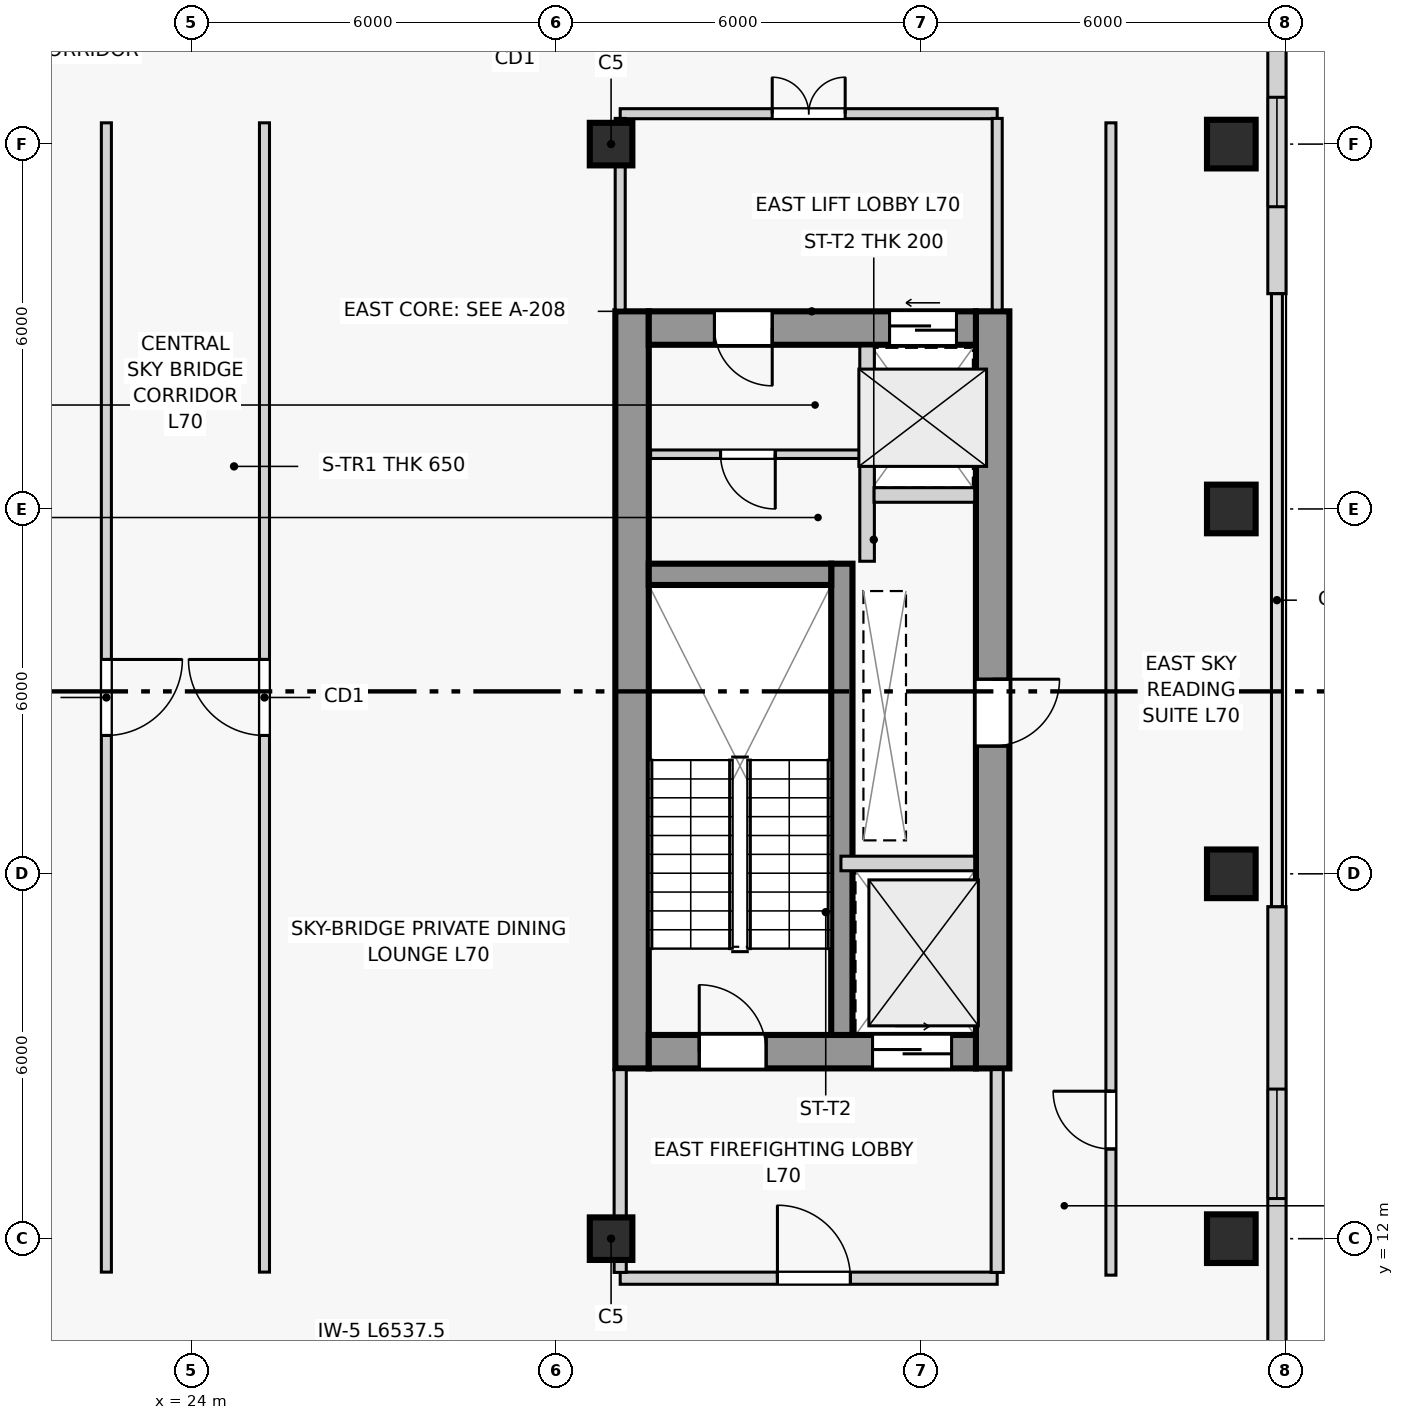
"""IFC4 building model, lengths in metres.
Left out: names, types, materials, properties, quantities, classifications, styles, units other than length and angle.
Written with IfcOpenShell. Run it as: python <this file> out.ifc"""

import sys

from ifc_helpers import new_model, si_unit, direction, frame, frame_2d, origin, origin_2d, place, context, subcontext, project, spatial, rectangle, extrude, source, transform, mapped, element, fill, save


model = new_model("IFC4")
c1 = context("Model", 3, precision=1e-05, world=origin(), true_north=direction((0.0, 1.0)))
c2 = subcontext(c1, "Body", "Model", "MODEL_VIEW")
j1 = project(units=[si_unit("LENGTHUNIT", "METRE"), si_unit("PLANEANGLEUNIT", "RADIAN")], contexts=[c1])
p1 = place(None, origin())
s1 = spatial("IfcSite", under=j1, at=p1, CompositionType="ELEMENT")
p2 = place(p1, origin())
s2 = spatial("IfcBuilding", under=s1, at=p2, CompositionType="ELEMENT")
p3 = place(p2, frame((0.0, 0.0, 267.3)))
s3 = spatial("IfcBuildingStorey", under=s2, at=p3, CompositionType="ELEMENT", Elevation=267.3)
p4 = place(p3, frame((31.245, 14.8, 0.0), z_axis=(0.0, 0.0, 1.0), x_axis=(0.0, 1.0, 0.0)))
e1 = element("IfcWall", 1, at=p4, inside=s3, PredefinedType="SHEAR", context=c2, shape_type="SweptSolid", body=[
    extrude(rectangle(XDim=12.45, YDim=0.55, at=frame_2d((6.225, 0.0))), origin(), (0.0, 0.0, 1.0), 3.6),
])
p5 = place(p3, frame((37.175, 14.8, 0.0), z_axis=(0.0, 0.0, 1.0), x_axis=(0.0, 1.0, 0.0)))
e2 = element("IfcWall", 2, at=p5, inside=s3, PredefinedType="SHEAR", context=c2, shape_type="SweptSolid", body=[
    extrude(rectangle(XDim=12.45, YDim=0.55, at=frame_2d((6.225, 0.0))), origin(), (0.0, 0.0, 1.0), 3.6),
])
p6 = place(p5, frame((5.3, 0.0, 0.0)))
e3 = element("IfcOpeningElement", 3, at=p6, cuts=e2, PredefinedType="OPENING", context=c2, shape_type="SweptSolid", body=[
    extrude(rectangle(XDim=1.1, YDim=2.2, at=frame_2d((0.55, 1.1))), frame((0.0, 0.285, 0.0), z_axis=(0.0, -1.0, 0.0), x_axis=(1.0, 0.0, 0.0)), (0.0, 0.0, 1.0), 0.57),
])
p7 = place(p3, frame((31.52, 15.075, 0.0), z_axis=(0.0, 0.0, 1.0), x_axis=(1.0, 0.0, 0.0)))
e4 = element("IfcWall", 4, at=p7, inside=s3, PredefinedType="SHEAR", context=c2, shape_type="SweptSolid", body=[
    extrude(rectangle(XDim=5.38, YDim=0.55, at=frame_2d((2.69, 0.0))), origin(), (0.0, 0.0, 1.0), 3.6),
])
p8 = place(p7, frame((0.83, 0.0, 0.0)))
e5 = element("IfcOpeningElement", 5, at=p8, cuts=e4, PredefinedType="OPENING", context=c2, shape_type="SweptSolid", body=[
    extrude(rectangle(XDim=1.1, YDim=2.2, at=frame_2d((0.55, 1.1))), frame((0.0, 0.285, 0.0), z_axis=(0.0, -1.0, 0.0), x_axis=(1.0, 0.0, 0.0)), (0.0, 0.0, 1.0), 0.57),
])
p9 = place(p7, frame((3.68, 0.0, 0.0)))
e6 = element("IfcOpeningElement", 6, at=p9, cuts=e4, PredefinedType="OPENING", context=c2, shape_type="SweptSolid", body=[
    extrude(rectangle(XDim=1.3, YDim=2.2, at=frame_2d((0.65, 1.1))), frame((0.0, 0.285, 0.0), z_axis=(0.0, -1.0, 0.0), x_axis=(1.0, 0.0, 0.0)), (0.0, 0.0, 1.0), 0.57),
])
p10 = place(p3, frame((31.52, 26.975, 0.0), z_axis=(0.0, 0.0, 1.0), x_axis=(1.0, 0.0, 0.0)))
e7 = element("IfcWall", 7, at=p10, inside=s3, PredefinedType="SHEAR", context=c2, shape_type="SweptSolid", body=[
    extrude(rectangle(XDim=5.38, YDim=0.55, at=frame_2d((2.69, 0.0))), origin(), (0.0, 0.0, 1.0), 3.6),
])
p11 = place(p10, frame((1.08, 0.0, 0.0)))
e8 = element("IfcOpeningElement", 8, at=p11, cuts=e7, PredefinedType="OPENING", context=c2, shape_type="SweptSolid", body=[
    extrude(rectangle(XDim=0.95, YDim=2.1, at=frame_2d((0.475, 1.05))), frame((0.0, 0.285, 0.0), z_axis=(0.0, -1.0, 0.0), x_axis=(1.0, 0.0, 0.0)), (0.0, 0.0, 1.0), 0.57),
])
p12 = place(p10, frame((3.96, 0.0, 0.0)))
e9 = element("IfcOpeningElement", 9, at=p12, cuts=e7, PredefinedType="OPENING", context=c2, shape_type="SweptSolid", body=[
    extrude(rectangle(XDim=1.1, YDim=2.2, at=frame_2d((0.55, 1.1))), frame((0.0, 0.285, 0.0), z_axis=(0.0, -1.0, 0.0), x_axis=(1.0, 0.0, 0.0)), (0.0, 0.0, 1.0), 0.57),
])
p13 = place(p3, frame((34.695, 15.35, 0.0), z_axis=(0.0, 0.0, 1.0), x_axis=(0.0, 1.0, 0.0)))
e10 = element("IfcWall", 10, at=p13, inside=s3, PredefinedType="SHEAR", context=c2, shape_type="SweptSolid", body=[
    extrude(rectangle(XDim=7.75, YDim=0.35, at=frame_2d((3.875, 0.0))), origin(), (0.0, 0.0, 1.0), 3.6),
])
p14 = place(p3, frame((31.52, 22.925, 0.0), z_axis=(0.0, 0.0, 1.0), x_axis=(1.0, 0.0, 0.0)))
e11 = element("IfcWall", 11, at=p14, inside=s3, PredefinedType="SHEAR", context=c2, shape_type="SweptSolid", body=[
    extrude(rectangle(XDim=3.0, YDim=0.35, at=frame_2d((1.5, 0.0))), origin(), (0.0, 0.0, 1.0), 3.6),
])
m1 = source(origin(), c2, "Body", "SweptSolid", [
    extrude(rectangle(XDim=0.8, YDim=0.8, at=origin_2d()), origin(), (0.0, 0.0, 1.0), 3.6),
])
for number, where, z_axis, x_axis in (
    (12, (41.1, 12.0, 0.0), (0.0, 0.0, 1.0), (1.0, 0.0, 0.0)),
    (13, (41.1, 18.0, 0.0), (0.0, 0.0, 1.0), (1.0, 0.0, 0.0)),
    (14, (41.1, 24.0, 0.0), (0.0, 0.0, 1.0), (1.0, 0.0, 0.0)),
    (15, (41.1, 30.0, 0.0), (0.0, 0.0, 1.0), (1.0, 0.0, 0.0)),
):
    element("IfcColumn", number, at=place(p3, frame(where, z_axis=z_axis, x_axis=x_axis)), inside=s3, PredefinedType="COLUMN", context=c2, shape_type="MappedRepresentation", body=[
        mapped(m1, transform((0.0, 0.0, 0.0), scale=1.0)),
    ])
m2 = source(origin(), c2, "Body", "SweptSolid", [
    extrude(rectangle(XDim=0.7, YDim=0.7, at=origin_2d()), origin(), (0.0, 0.0, 1.0), 3.6),
])
for number, where, z_axis, x_axis in (
    (16, (30.9, 12.0, 0.0), (0.0, 0.0, 1.0), (1.0, 0.0, 0.0)),
    (17, (30.9, 30.0, 0.0), (0.0, 0.0, 1.0), (1.0, 0.0, 0.0)),
):
    element("IfcColumn", number, at=place(p3, frame(where, z_axis=z_axis, x_axis=x_axis)), inside=s3, PredefinedType="COLUMN", context=c2, shape_type="MappedRepresentation", body=[
        mapped(m2, transform((0.0, 0.0, 0.0), scale=1.0)),
    ])
p15 = place(p3, frame((41.85, 6.75, 0.0), z_axis=(0.0, 0.0, 1.0), x_axis=(0.0, 1.0, 0.0)))
e18 = element("IfcWall", 18, at=p15, inside=s3, PredefinedType="SOLIDWALL", context=c2, shape_type="SweptSolid", body=[
    extrude(rectangle(XDim=10.71, YDim=0.3, at=frame_2d((5.355, 0.0))), origin(), (0.0, 0.0, 1.0), 3.32),
])
p16 = place(p15, frame((0.655, 0.0, 0.8)))
e19 = element("IfcOpeningElement", 19, at=p16, cuts=e18, PredefinedType="OPENING", context=c2, shape_type="SweptSolid", body=[
    extrude(rectangle(XDim=1.8, YDim=2.1, at=frame_2d((0.9, 1.05))), frame((0.0, 0.16, 0.0), z_axis=(0.0, -1.0, 0.0), x_axis=(1.0, 0.0, 0.0)), (0.0, 0.0, 1.0), 0.32),
])
p17 = place(p15, frame((5.91, 0.0, 0.8)))
e20 = element("IfcOpeningElement", 20, at=p17, cuts=e18, PredefinedType="OPENING", context=c2, shape_type="SweptSolid", body=[
    extrude(rectangle(XDim=1.8, YDim=2.1, at=frame_2d((0.9, 1.05))), frame((0.0, 0.16, 0.0), z_axis=(0.0, -1.0, 0.0), x_axis=(1.0, 0.0, 0.0)), (0.0, 0.0, 1.0), 0.32),
])
p18 = place(p3, frame((41.85, 27.54, 0.0), z_axis=(0.0, 0.0, 1.0), x_axis=(0.0, 1.0, 0.0)))
e21 = element("IfcWall", 21, at=p18, inside=s3, PredefinedType="SOLIDWALL", context=c2, shape_type="SweptSolid", body=[
    extrude(rectangle(XDim=10.71, YDim=0.3, at=frame_2d((5.355, 0.0))), origin(), (0.0, 0.0, 1.0), 3.32),
])
p19 = place(p18, frame((1.43, 0.0, 0.8)))
e22 = element("IfcOpeningElement", 22, at=p19, cuts=e21, PredefinedType="OPENING", context=c2, shape_type="SweptSolid", body=[
    extrude(rectangle(XDim=1.8, YDim=2.1, at=frame_2d((0.9, 1.05))), frame((0.0, 0.16, 0.0), z_axis=(0.0, -1.0, 0.0), x_axis=(1.0, 0.0, 0.0)), (0.0, 0.0, 1.0), 0.32),
])
p20 = place(p18, frame((6.685, 0.0, 0.8)))
e23 = element("IfcOpeningElement", 23, at=p20, cuts=e21, PredefinedType="OPENING", context=c2, shape_type="SweptSolid", body=[
    extrude(rectangle(XDim=1.8, YDim=2.1, at=frame_2d((0.9, 1.05))), frame((0.0, 0.16, 0.0), z_axis=(0.0, -1.0, 0.0), x_axis=(1.0, 0.0, 0.0)), (0.0, 0.0, 1.0), 0.32),
])
p21 = place(p3, frame((34.68, 18.17, 0.0), z_axis=(0.0, 0.0, 1.0), x_axis=(1.0, 0.0, 0.0)))
e24 = element("IfcWall", 24, at=p21, inside=s3, PredefinedType="PARTITIONING", context=c2, shape_type="SweptSolid", body=[
    extrude(rectangle(XDim=2.2, YDim=0.24, at=frame_2d((1.1, 0.0))), origin(), (0.0, 0.0, 1.0), 3.32),
])
p22 = place(p3, frame((31.05, 11.35, 0.0), z_axis=(0.0, 0.0, 1.0), x_axis=(1.0, 0.0, 0.0)))
e25 = element("IfcWall", 25, at=p22, inside=s3, PredefinedType="PARTITIONING", context=c2, shape_type="SweptSolid", body=[
    extrude(rectangle(XDim=6.2, YDim=0.2, at=frame_2d((3.1, 0.0))), origin(), (0.0, 0.0, 1.0), 3.32),
])
p23 = place(p22, frame((2.586, 0.0, 0.0)))
e26 = element("IfcOpeningElement", 26, at=p23, cuts=e25, PredefinedType="OPENING", context=c2, shape_type="SweptSolid", body=[
    extrude(rectangle(XDim=1.2, YDim=2.2, at=frame_2d((0.6, 1.1))), frame((0.0, 0.11, 0.0), z_axis=(0.0, -1.0, 0.0), x_axis=(1.0, 0.0, 0.0)), (0.0, 0.0, 1.0), 0.22),
])
p24 = place(p3, frame((31.05, 11.445, 0.0), z_axis=(0.0, 0.0, 1.0), x_axis=(0.0, 1.0, 0.0)))
e27 = element("IfcWall", 27, at=p24, inside=s3, PredefinedType="PARTITIONING", context=c2, shape_type="SweptSolid", body=[
    extrude(rectangle(XDim=3.335, YDim=0.2, at=frame_2d((1.667, 0.0))), origin(), (0.0, 0.0, 1.0), 2.47),
])
p25 = place(p3, frame((37.25, 11.445, 0.0), z_axis=(0.0, 0.0, 1.0), x_axis=(0.0, 1.0, 0.0)))
e28 = element("IfcWall", 28, at=p25, inside=s3, PredefinedType="PARTITIONING", context=c2, shape_type="SweptSolid", body=[
    extrude(rectangle(XDim=3.335, YDim=0.2, at=frame_2d((1.667, 0.0))), origin(), (0.0, 0.0, 1.0), 3.32),
])
p26 = place(p3, frame((35.11, 23.14, 0.0), z_axis=(0.0, 0.0, 1.0), x_axis=(0.0, 1.0, 0.0)))
e29 = element("IfcWall", 29, at=p26, inside=s3, PredefinedType="PARTITIONING", context=c2, shape_type="SweptSolid", body=[
    extrude(rectangle(XDim=3.54, YDim=0.24, at=frame_2d((1.77, 0.0))), origin(), (0.0, 0.0, 1.0), 3.32),
])
p27 = place(p3, frame((35.225, 24.23, 0.0), z_axis=(0.0, 0.0, 1.0), x_axis=(1.0, 0.0, 0.0)))
e30 = element("IfcWall", 30, at=p27, inside=s3, PredefinedType="PARTITIONING", context=c2, shape_type="SweptSolid", body=[
    extrude(rectangle(XDim=1.655, YDim=0.24, at=frame_2d((0.827, 0.0))), origin(), (0.0, 0.0, 1.0), 3.32),
])
p28 = place(p3, frame((31.55, 24.9, 0.0), z_axis=(0.0, 0.0, 1.0), x_axis=(1.0, 0.0, 0.0)))
e31 = element("IfcWall", 31, at=p28, inside=s3, PredefinedType="PARTITIONING", context=c2, shape_type="SweptSolid", body=[
    extrude(rectangle(XDim=3.445, YDim=0.14, at=frame_2d((1.723, 0.0))), origin(), (0.0, 0.0, 1.0), 3.32),
])
p29 = place(p28, frame((1.15, 0.0, 0.0)))
e32 = element("IfcOpeningElement", 32, at=p29, cuts=e31, PredefinedType="OPENING", context=c2, shape_type="SweptSolid", body=[
    extrude(rectangle(XDim=0.9, YDim=2.1, at=frame_2d((0.45, 1.05))), frame((0.0, 0.08, 0.0), z_axis=(0.0, -1.0, 0.0), x_axis=(1.0, 0.0, 0.0)), (0.0, 0.0, 1.0), 0.16),
])
p30 = place(p3, frame((31.05, 30.5, 0.0), z_axis=(0.0, 0.0, 1.0), x_axis=(1.0, 0.0, 0.0)))
e33 = element("IfcWall", 33, at=p30, inside=s3, PredefinedType="PARTITIONING", context=c2, shape_type="SweptSolid", body=[
    extrude(rectangle(XDim=6.2, YDim=0.165, at=frame_2d((3.1, 0.0))), origin(), (0.0, 0.0, 1.0), 3.32),
])
p31 = place(p30, frame((2.5, 0.0, 0.0)))
e34 = element("IfcOpeningElement", 34, at=p31, cuts=e33, PredefinedType="OPENING", context=c2, shape_type="SweptSolid", body=[
    extrude(rectangle(XDim=1.2, YDim=2.2, at=frame_2d((0.6, 1.1))), frame((0.0, 0.093, 0.0), z_axis=(0.0, -1.0, 0.0), x_axis=(1.0, 0.0, 0.0)), (0.0, 0.0, 1.0), 0.185),
])
for number, where, z_axis, x_axis in (
    (35, (31.05, 27.27, 0.0), (0.0, 0.0, 1.0), (0.0, 1.0, 0.0)),
    (36, (37.25, 27.27, 0.0), (0.0, 0.0, 1.0), (0.0, 1.0, 0.0)),
):
    element("IfcWall", number, at=place(p3, frame(where, z_axis=z_axis, x_axis=x_axis)), inside=s3, PredefinedType="PARTITIONING", context=c2, shape_type="SweptSolid", body=[
        extrude(rectangle(XDim=3.153, YDim=0.165, at=frame_2d((1.576, 0.0))), origin(), (0.0, 0.0, 1.0), 3.32),
    ])
p32 = place(p3, frame((22.6, 11.45, 0.0), z_axis=(0.0, 0.0, 1.0), x_axis=(0.0, 1.0, 0.0)))
e37 = element("IfcWall", 37, at=p32, inside=s3, PredefinedType="PARTITIONING", context=c2, shape_type="SweptSolid", body=[
    extrude(rectangle(XDim=18.9, YDim=0.165, at=frame_2d((9.45, 0.0))), origin(), (0.0, 0.0, 1.0), 3.32),
])
p33 = place(p32, frame((8.825, 0.0, 0.0)))
e38 = element("IfcOpeningElement", 38, at=p33, cuts=e37, PredefinedType="OPENING", context=c2, shape_type="SweptSolid", body=[
    extrude(rectangle(XDim=1.25, YDim=2.2, at=frame_2d((0.625, 1.1))), frame((0.0, 0.093, 0.0), z_axis=(0.0, -1.0, 0.0), x_axis=(1.0, 0.0, 0.0)), (0.0, 0.0, 1.0), 0.185),
])
p34 = place(p3, frame((25.2, 11.45, 0.0), z_axis=(0.0, 0.0, 1.0), x_axis=(0.0, 1.0, 0.0)))
e39 = element("IfcWall", 39, at=p34, inside=s3, PredefinedType="PARTITIONING", context=c2, shape_type="SweptSolid", body=[
    extrude(rectangle(XDim=18.9, YDim=0.165, at=frame_2d((9.45, 0.0))), origin(), (0.0, 0.0, 1.0), 3.32),
])
p35 = place(p34, frame((8.825, 0.0, 0.0)))
e40 = element("IfcOpeningElement", 40, at=p35, cuts=e39, PredefinedType="OPENING", context=c2, shape_type="SweptSolid", body=[
    extrude(rectangle(XDim=1.25, YDim=2.2, at=frame_2d((0.625, 1.1))), frame((0.0, 0.093, 0.0), z_axis=(0.0, -1.0, 0.0), x_axis=(1.0, 0.0, 0.0)), (0.0, 0.0, 1.0), 0.185),
])
p36 = place(p3, frame((39.12, 11.4, 0.0), z_axis=(0.0, 0.0, 1.0), x_axis=(0.0, 1.0, 0.0)))
e41 = element("IfcWall", 41, at=p36, inside=s3, PredefinedType="PARTITIONING", context=c2, shape_type="SweptSolid", body=[
    extrude(rectangle(XDim=18.95, YDim=0.165, at=frame_2d((9.475, 0.0))), origin(), (0.0, 0.0, 1.0), 3.32),
])
p37 = place(p36, frame((2.075, 0.0, 0.0)))
e42 = element("IfcOpeningElement", 42, at=p37, cuts=e41, PredefinedType="OPENING", context=c2, shape_type="SweptSolid", body=[
    extrude(rectangle(XDim=0.95, YDim=2.1, at=frame_2d((0.475, 1.05))), frame((0.0, 0.093, 0.0), z_axis=(0.0, -1.0, 0.0), x_axis=(1.0, 0.0, 0.0)), (0.0, 0.0, 1.0), 0.185),
])
m3 = source(origin(), c2, "Body", "SweptSolid", [
    extrude(rectangle(XDim=1.8, YDim=2.1, at=frame_2d((0.9, 1.05))), frame((0.0, 0.03, 0.0), z_axis=(0.0, -1.0, 0.0), x_axis=(1.0, 0.0, 0.0)), (0.0, 0.0, 1.0), 0.06),
])
p38 = place(p17, origin())
e43 = element("IfcWindow", 43, at=p38, inside=s3, PartitioningType="SINGLE_PANEL", PredefinedType="WINDOW", context=c2, shape_type="MappedRepresentation", body=[
    mapped(m3, transform((0.0, 0.0, 0.0), scale=1.0)),
])
fill(e20, e43)
p39 = place(p19, origin())
e44 = element("IfcWindow", 44, at=p39, inside=s3, PartitioningType="SINGLE_PANEL", PredefinedType="WINDOW", context=c2, shape_type="MappedRepresentation", body=[
    mapped(m3, transform((0.0, 0.0, 0.0), scale=1.0)),
])
fill(e22, e44)
m4 = source(origin(), c2, "Body", "SweptSolid", [
    extrude(rectangle(XDim=1.1, YDim=2.2, at=frame_2d((0.55, 1.1))), frame((0.0, 0.025, 0.0), z_axis=(0.0, -1.0, 0.0), x_axis=(1.0, 0.0, 0.0)), (0.0, 0.0, 1.0), 0.05),
])
p40 = place(p8, origin())
e45 = element("IfcDoor", 45, at=p40, inside=s3, OperationType="SINGLE_SWING_LEFT", PredefinedType="DOOR", context=c2, shape_type="MappedRepresentation", body=[
    mapped(m4, transform((0.0, 0.0, 0.0), scale=1.0)),
])
fill(e5, e45)
m5 = source(origin(), c2, "Body", "SweptSolid", [
    extrude(rectangle(XDim=1.3, YDim=2.2, at=frame_2d((0.65, 1.1))), frame((0.0, 0.025, 0.0), z_axis=(0.0, -1.0, 0.0), x_axis=(1.0, 0.0, 0.0)), (0.0, 0.0, 1.0), 0.05),
])
p41 = place(p9, origin())
e46 = element("IfcDoor", 46, at=p41, inside=s3, OperationType="SLIDING_TO_RIGHT", PredefinedType="DOOR", context=c2, shape_type="MappedRepresentation", body=[
    mapped(m5, transform((0.0, 0.0, 0.0), scale=1.0)),
])
fill(e6, e46)
m6 = source(origin(), c2, "Body", "SweptSolid", [
    extrude(rectangle(XDim=1.2, YDim=2.2, at=frame_2d((0.6, 1.1))), frame((0.0, 0.025, 0.0), z_axis=(0.0, -1.0, 0.0), x_axis=(1.0, 0.0, 0.0)), (0.0, 0.0, 1.0), 0.05),
])
p42 = place(p23, origin())
e47 = element("IfcDoor", 47, at=p42, inside=s3, OperationType="SINGLE_SWING_LEFT", PredefinedType="DOOR", context=c2, shape_type="MappedRepresentation", body=[
    mapped(m6, transform((0.0, 0.0, 0.0), scale=1.0)),
])
fill(e26, e47)
m7 = source(origin(), c2, "Body", "SweptSolid", [
    extrude(rectangle(XDim=0.95, YDim=2.1, at=frame_2d((0.475, 1.05))), frame((0.0, 0.025, 0.0), z_axis=(0.0, -1.0, 0.0), x_axis=(1.0, 0.0, 0.0)), (0.0, 0.0, 1.0), 0.05),
])
p43 = place(p11, frame((0.95, 0.0, 0.0), z_axis=(0.0, 0.0, 1.0), x_axis=(-1.0, 0.0, 0.0)))
e48 = element("IfcDoor", 48, at=p43, inside=s3, OperationType="SINGLE_SWING_LEFT", PredefinedType="DOOR", context=c2, shape_type="MappedRepresentation", body=[
    mapped(m7, transform((0.0, 0.0, 0.0), scale=1.0)),
])
fill(e8, e48)
m8 = source(origin(), c2, "Body", "SweptSolid", [
    extrude(rectangle(XDim=0.9, YDim=2.1, at=frame_2d((0.45, 1.05))), frame((0.0, 0.025, 0.0), z_axis=(0.0, -1.0, 0.0), x_axis=(1.0, 0.0, 0.0)), (0.0, 0.0, 1.0), 0.05),
])
p44 = place(p29, frame((0.9, 0.0, 0.0), z_axis=(0.0, 0.0, 1.0), x_axis=(-1.0, 0.0, 0.0)))
e49 = element("IfcDoor", 49, at=p44, inside=s3, OperationType="SINGLE_SWING_LEFT", PredefinedType="DOOR", context=c2, shape_type="MappedRepresentation", body=[
    mapped(m8, transform((0.0, 0.0, 0.0), scale=1.0)),
])
fill(e32, e49)
m9 = source(origin(), c2, "Body", "SweptSolid", [
    extrude(rectangle(XDim=1.1, YDim=2.2, at=frame_2d((0.55, 1.1))), frame((0.0, 0.025, 0.0), z_axis=(0.0, -1.0, 0.0), x_axis=(1.0, 0.0, 0.0)), (0.0, 0.0, 1.0), 0.05),
])
p45 = place(p12, origin())
e50 = element("IfcDoor", 50, at=p45, inside=s3, OperationType="SLIDING_TO_LEFT", PredefinedType="DOOR", context=c2, shape_type="MappedRepresentation", body=[
    mapped(m9, transform((0.0, 0.0, 0.0), scale=1.0)),
])
fill(e9, e50)
p46 = place(p31, origin())
e51 = element("IfcDoor", 51, at=p46, inside=s3, OperationType="DOUBLE_DOOR_SINGLE_SWING", PredefinedType="DOOR", context=c2, shape_type="MappedRepresentation", body=[
    mapped(m6, transform((0.0, 0.0, 0.0), scale=1.0)),
])
fill(e34, e51)
p47 = place(p6, frame((1.1, 0.0, 0.0), z_axis=(0.0, 0.0, 1.0), x_axis=(-1.0, 0.0, 0.0)))
e52 = element("IfcDoor", 52, at=p47, inside=s3, OperationType="SINGLE_SWING_LEFT", PredefinedType="DOOR", context=c2, shape_type="MappedRepresentation", body=[
    mapped(m4, transform((0.0, 0.0, 0.0), scale=1.0)),
])
fill(e3, e52)
m10 = source(origin(), c2, "Body", "SweptSolid", [
    extrude(rectangle(XDim=1.25, YDim=2.2, at=frame_2d((0.625, 1.1))), frame((0.0, 0.025, 0.0), z_axis=(0.0, -1.0, 0.0), x_axis=(1.0, 0.0, 0.0)), (0.0, 0.0, 1.0), 0.05),
])
p48 = place(p33, frame((1.25, 0.0, 0.0), z_axis=(0.0, 0.0, 1.0), x_axis=(-1.0, 0.0, 0.0)))
e53 = element("IfcDoor", 53, at=p48, inside=s3, OperationType="SINGLE_SWING_LEFT", PredefinedType="DOOR", context=c2, shape_type="MappedRepresentation", body=[
    mapped(m10, transform((0.0, 0.0, 0.0), scale=1.0)),
])
fill(e38, e53)
p49 = place(p35, origin())
e54 = element("IfcDoor", 54, at=p49, inside=s3, OperationType="SINGLE_SWING_RIGHT", PredefinedType="DOOR", context=c2, shape_type="MappedRepresentation", body=[
    mapped(m10, transform((0.0, 0.0, 0.0), scale=1.0)),
])
fill(e40, e54)
p50 = place(p37, origin())
e55 = element("IfcDoor", 55, at=p50, inside=s3, OperationType="SINGLE_SWING_RIGHT", PredefinedType="DOOR", context=c2, shape_type="MappedRepresentation", body=[
    mapped(m7, transform((0.0, 0.0, 0.0), scale=1.0)),
])
fill(e42, e55)
save(model, sys.argv[1])
